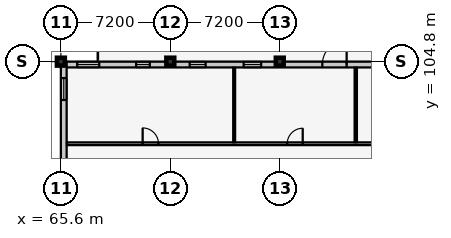
"""IFC4 building model, lengths in metres.
Left out: names, types, materials, properties, quantities, classifications, styles, units other than length and angle.
Written with IfcOpenShell. Run it as: python <this file> out.ifc"""

import sys

from ifc_helpers import new_model, si_unit, direction, frame, frame_2d, origin, origin_2d, place, context, subcontext, project, spatial, rectangle, extrude, element, fill, save


model = new_model("IFC4")
c1 = context("Model", 3, precision=1e-05, world=origin(), true_north=direction((0.0, 1.0)))
c2 = subcontext(c1, "Body", "Model", "MODEL_VIEW")
j1 = project(units=[si_unit("LENGTHUNIT", "METRE"), si_unit("PLANEANGLEUNIT", "RADIAN")], contexts=[c1])
p1 = place(None, origin())
s1 = spatial("IfcSite", under=j1, at=p1, CompositionType="ELEMENT")
p2 = place(p1, origin())
s2 = spatial("IfcBuilding", under=s1, at=p2, CompositionType="ELEMENT")
p3 = place(p2, frame((0.0, 0.0, 21.9)))
s3 = spatial("IfcBuildingStorey", under=s2, at=p3, CompositionType="ELEMENT", Elevation=21.9)
for number, where, z_axis, x_axis in (
    (1, (65.6, 104.8, 0.0), (0.0, 0.0, 1.0), (1.0, 0.0, 0.0)),
    (2, (72.8, 104.8, 0.0), (0.0, 0.0, 1.0), (1.0, 0.0, 0.0)),
    (3, (80.0, 104.8, 0.0), (0.0, 0.0, 1.0), (1.0, 0.0, 0.0)),
):
    element("IfcColumn", number, at=place(p3, frame(where, z_axis=z_axis, x_axis=x_axis)), inside=s3, PredefinedType="COLUMN", context=c2, shape_type="SweptSolid", body=[
        extrude(rectangle(XDim=0.52, YDim=0.52, at=origin_2d()), origin(), (0.0, 0.0, 1.0), 3.9),
    ])
p4 = place(p3, frame((65.6, 104.61, 0.0), z_axis=(0.0, 0.0, 1.0), x_axis=(1.0, 0.0, 0.0)))
e4 = element("IfcWall", 4, at=p4, inside=s3, PredefinedType="SOLIDWALL", context=c2, shape_type="SweptSolid", body=[
    extrude(rectangle(XDim=28.8, YDim=0.38, at=frame_2d((14.4, 0.0))), origin(), (0.0, 0.0, 1.0), 2.955),
])
p5 = place(p4, frame((17.2, 0.0, 0.0)))
e5 = element("IfcOpeningElement", 5, at=p5, cuts=e4, PredefinedType="OPENING", context=c2, shape_type="SweptSolid", body=[
    extrude(rectangle(XDim=1.6, YDim=2.2, at=frame_2d((0.8, 1.1))), frame((0.0, 0.202, 0.0), z_axis=(0.0, -1.0, 0.0), x_axis=(1.0, 0.0, 0.0)), (0.0, 0.0, 1.0), 0.404),
])
p6 = place(p4, frame((1.075, 0.0, 0.9)))
e6 = element("IfcOpeningElement", 6, at=p6, cuts=e4, PredefinedType="OPENING", context=c2, shape_type="SweptSolid", body=[
    extrude(rectangle(XDim=1.45, YDim=1.45, at=frame_2d((0.725, 0.725))), frame((0.0, 0.202, 0.0), z_axis=(0.0, -1.0, 0.0), x_axis=(1.0, 0.0, 0.0)), (0.0, 0.0, 1.0), 0.404),
])
p7 = place(p4, frame((4.95, 0.0, 0.9)))
e7 = element("IfcOpeningElement", 7, at=p7, cuts=e4, PredefinedType="OPENING", context=c2, shape_type="SweptSolid", body=[
    extrude(rectangle(XDim=0.9, YDim=1.6, at=frame_2d((0.45, 0.8))), frame((0.0, 0.202, 0.0), z_axis=(0.0, -1.0, 0.0), x_axis=(1.0, 0.0, 0.0)), (0.0, 0.0, 1.0), 0.404),
])
p8 = place(p4, frame((8.475, 0.0, 0.9)))
e8 = element("IfcOpeningElement", 8, at=p8, cuts=e4, PredefinedType="OPENING", context=c2, shape_type="SweptSolid", body=[
    extrude(rectangle(XDim=1.05, YDim=1.6, at=frame_2d((0.525, 0.8))), frame((0.0, 0.202, 0.0), z_axis=(0.0, -1.0, 0.0), x_axis=(1.0, 0.0, 0.0)), (0.0, 0.0, 1.0), 0.404),
])
p9 = place(p4, frame((12.025, 0.0, 0.9)))
e9 = element("IfcOpeningElement", 9, at=p9, cuts=e4, PredefinedType="OPENING", context=c2, shape_type="SweptSolid", body=[
    extrude(rectangle(XDim=1.15, YDim=1.6, at=frame_2d((0.575, 0.8))), frame((0.0, 0.202, 0.0), z_axis=(0.0, -1.0, 0.0), x_axis=(1.0, 0.0, 0.0)), (0.0, 0.0, 1.0), 0.404),
])
p10 = place(p4, frame((22.65, 0.0, 0.9)))
e10 = element("IfcOpeningElement", 10, at=p10, cuts=e4, PredefinedType="OPENING", context=c2, shape_type="SweptSolid", body=[
    extrude(rectangle(XDim=1.5, YDim=1.6, at=frame_2d((0.75, 0.8))), frame((0.0, 0.202, 0.0), z_axis=(0.0, -1.0, 0.0), x_axis=(1.0, 0.0, 0.0)), (0.0, 0.0, 1.0), 0.404),
])
p11 = place(p4, frame((26.5, 0.0, 0.9)))
e11 = element("IfcOpeningElement", 11, at=p11, cuts=e4, PredefinedType="OPENING", context=c2, shape_type="SweptSolid", body=[
    extrude(rectangle(XDim=1.0, YDim=1.75, at=frame_2d((0.5, 0.875))), frame((0.0, 0.202, 0.0), z_axis=(0.0, -1.0, 0.0), x_axis=(1.0, 0.0, 0.0)), (0.0, 0.0, 1.0), 0.404),
])
p12 = place(p3, frame((65.79, 90.4, 0.0), z_axis=(0.0, 0.0, 1.0), x_axis=(0.0, 1.0, 0.0)))
e12 = element("IfcWall", 12, at=p12, inside=s3, PredefinedType="SOLIDWALL", context=c2, shape_type="SweptSolid", body=[
    extrude(rectangle(XDim=14.4, YDim=0.38, at=frame_2d((7.2, 0.0))), origin(), (0.0, 0.0, 1.0), 2.915),
])
p13 = place(p12, frame((1.24, 0.0, 0.9)))
e13 = element("IfcOpeningElement", 13, at=p13, cuts=e12, PredefinedType="OPENING", context=c2, shape_type="SweptSolid", body=[
    extrude(rectangle(XDim=1.12, YDim=1.75, at=frame_2d((0.56, 0.875))), frame((0.0, 0.202, 0.0), z_axis=(0.0, -1.0, 0.0), x_axis=(1.0, 0.0, 0.0)), (0.0, 0.0, 1.0), 0.404),
])
p14 = place(p12, frame((4.78, 0.0, 0.9)))
e14 = element("IfcOpeningElement", 14, at=p14, cuts=e12, PredefinedType="OPENING", context=c2, shape_type="SweptSolid", body=[
    extrude(rectangle(XDim=1.24, YDim=1.75, at=frame_2d((0.62, 0.875))), frame((0.0, 0.202, 0.0), z_axis=(0.0, -1.0, 0.0), x_axis=(1.0, 0.0, 0.0)), (0.0, 0.0, 1.0), 0.404),
])
p15 = place(p12, frame((11.88, 0.0, 0.9)))
e15 = element("IfcOpeningElement", 15, at=p15, cuts=e12, PredefinedType="OPENING", context=c2, shape_type="SweptSolid", body=[
    extrude(rectangle(XDim=1.44, YDim=1.75, at=frame_2d((0.72, 0.875))), frame((0.0, 0.202, 0.0), z_axis=(0.0, -1.0, 0.0), x_axis=(1.0, 0.0, 0.0)), (0.0, 0.0, 1.0), 0.404),
])
p16 = place(p3, frame((66.0, 99.4, 0.0), z_axis=(0.0, 0.0, 1.0), x_axis=(1.0, 0.0, 0.0)))
e16 = element("IfcWall", 16, at=p16, inside=s3, PredefinedType="PARTITIONING", context=c2, shape_type="SweptSolid", body=[
    extrude(rectangle(XDim=28.0, YDim=0.18, at=frame_2d((14.0, 0.0))), origin(), (0.0, 0.0, 1.0), 3.66),
])
p17 = place(p16, frame((4.98, 0.0, 0.0)))
e17 = element("IfcOpeningElement", 17, at=p17, cuts=e16, PredefinedType="OPENING", context=c2, shape_type="SweptSolid", body=[
    extrude(rectangle(XDim=1.04, YDim=2.15, at=frame_2d((0.52, 1.075))), frame((0.0, 0.102, 0.0), z_axis=(0.0, -1.0, 0.0), x_axis=(1.0, 0.0, 0.0)), (0.0, 0.0, 1.0), 0.204),
])
p18 = place(p16, frame((14.49, 0.0, 0.0)))
e18 = element("IfcOpeningElement", 18, at=p18, cuts=e16, PredefinedType="OPENING", context=c2, shape_type="SweptSolid", body=[
    extrude(rectangle(XDim=1.02, YDim=2.12, at=frame_2d((0.51, 1.06))), frame((0.0, 0.102, 0.0), z_axis=(0.0, -1.0, 0.0), x_axis=(1.0, 0.0, 0.0)), (0.0, 0.0, 1.0), 0.204),
])
p19 = place(p16, frame((23.01, 0.0, 0.0)))
e19 = element("IfcOpeningElement", 19, at=p19, cuts=e16, PredefinedType="OPENING", context=c2, shape_type="SweptSolid", body=[
    extrude(rectangle(XDim=0.98, YDim=2.12, at=frame_2d((0.49, 1.06))), frame((0.0, 0.102, 0.0), z_axis=(0.0, -1.0, 0.0), x_axis=(1.0, 0.0, 0.0)), (0.0, 0.0, 1.0), 0.204),
])
p20 = place(p3, frame((77.0, 99.5, 0.0), z_axis=(0.0, 0.0, 1.0), x_axis=(0.0, 1.0, 0.0)))
e20 = element("IfcWall", 20, at=p20, inside=s3, PredefinedType="PARTITIONING", context=c2, shape_type="SweptSolid", body=[
    extrude(rectangle(XDim=4.9, YDim=0.125, at=frame_2d((2.45, 0.0))), origin(), (0.0, 0.0, 1.0), 3.66),
])
p21 = place(p3, frame((85.0, 99.5, 0.0), z_axis=(0.0, 0.0, 1.0), x_axis=(0.0, 1.0, 0.0)))
e21 = element("IfcWall", 21, at=p21, inside=s3, PredefinedType="PARTITIONING", context=c2, shape_type="SweptSolid", body=[
    extrude(rectangle(XDim=4.9, YDim=0.15, at=frame_2d((2.45, 0.0))), origin(), (0.0, 0.0, 1.0), 3.66),
])
p22 = place(p5, origin())
e22 = element("IfcDoor", 22, at=p22, inside=s3, OperationType="SINGLE_SWING_RIGHT", PredefinedType="DOOR", context=c2, shape_type="SweptSolid", body=[
    extrude(rectangle(XDim=1.6, YDim=2.2, at=frame_2d((0.8, 1.1))), frame((0.0, 0.025, 0.0), z_axis=(0.0, -1.0, 0.0), x_axis=(1.0, 0.0, 0.0)), (0.0, 0.0, 1.0), 0.05),
])
fill(e5, e22)
p23 = place(p6, origin())
e23 = element("IfcWindow", 23, at=p23, inside=s3, PartitioningType="SINGLE_PANEL", PredefinedType="WINDOW", context=c2, shape_type="SweptSolid", body=[
    extrude(rectangle(XDim=1.45, YDim=1.45, at=frame_2d((0.725, 0.725))), frame((0.0, 0.03, 0.0), z_axis=(0.0, -1.0, 0.0), x_axis=(1.0, 0.0, 0.0)), (0.0, 0.0, 1.0), 0.06),
])
fill(e6, e23)
p24 = place(p7, origin())
e24 = element("IfcWindow", 24, at=p24, inside=s3, PartitioningType="SINGLE_PANEL", PredefinedType="WINDOW", context=c2, shape_type="SweptSolid", body=[
    extrude(rectangle(XDim=0.9, YDim=1.6, at=frame_2d((0.45, 0.8))), frame((0.0, 0.03, 0.0), z_axis=(0.0, -1.0, 0.0), x_axis=(1.0, 0.0, 0.0)), (0.0, 0.0, 1.0), 0.06),
])
fill(e7, e24)
p25 = place(p8, origin())
e25 = element("IfcWindow", 25, at=p25, inside=s3, PartitioningType="SINGLE_PANEL", PredefinedType="WINDOW", context=c2, shape_type="SweptSolid", body=[
    extrude(rectangle(XDim=1.05, YDim=1.6, at=frame_2d((0.525, 0.8))), frame((0.0, 0.03, 0.0), z_axis=(0.0, -1.0, 0.0), x_axis=(1.0, 0.0, 0.0)), (0.0, 0.0, 1.0), 0.06),
])
fill(e8, e25)
p26 = place(p9, origin())
e26 = element("IfcWindow", 26, at=p26, inside=s3, PartitioningType="SINGLE_PANEL", PredefinedType="WINDOW", context=c2, shape_type="SweptSolid", body=[
    extrude(rectangle(XDim=1.15, YDim=1.6, at=frame_2d((0.575, 0.8))), frame((0.0, 0.03, 0.0), z_axis=(0.0, -1.0, 0.0), x_axis=(1.0, 0.0, 0.0)), (0.0, 0.0, 1.0), 0.06),
])
fill(e9, e26)
p27 = place(p15, origin())
e27 = element("IfcWindow", 27, at=p27, inside=s3, PartitioningType="SINGLE_PANEL", PredefinedType="WINDOW", context=c2, shape_type="SweptSolid", body=[
    extrude(rectangle(XDim=1.44, YDim=1.75, at=frame_2d((0.72, 0.875))), frame((0.0, 0.03, 0.0), z_axis=(0.0, -1.0, 0.0), x_axis=(1.0, 0.0, 0.0)), (0.0, 0.0, 1.0), 0.06),
])
fill(e15, e27)
p28 = place(p17, origin())
e28 = element("IfcDoor", 28, at=p28, inside=s3, OperationType="SINGLE_SWING_LEFT", PredefinedType="DOOR", context=c2, shape_type="SweptSolid", body=[
    extrude(rectangle(XDim=1.04, YDim=2.15, at=frame_2d((0.52, 1.075))), frame((0.0, 0.025, 0.0), z_axis=(0.0, -1.0, 0.0), x_axis=(1.0, 0.0, 0.0)), (0.0, 0.0, 1.0), 0.05),
])
fill(e17, e28)
p29 = place(p18, origin())
e29 = element("IfcDoor", 29, at=p29, inside=s3, OperationType="SINGLE_SWING_RIGHT", PredefinedType="DOOR", context=c2, shape_type="SweptSolid", body=[
    extrude(rectangle(XDim=1.02, YDim=2.12, at=frame_2d((0.51, 1.06))), frame((0.0, 0.025, 0.0), z_axis=(0.0, -1.0, 0.0), x_axis=(1.0, 0.0, 0.0)), (0.0, 0.0, 1.0), 0.05),
])
fill(e18, e29)
save(model, sys.argv[1])
